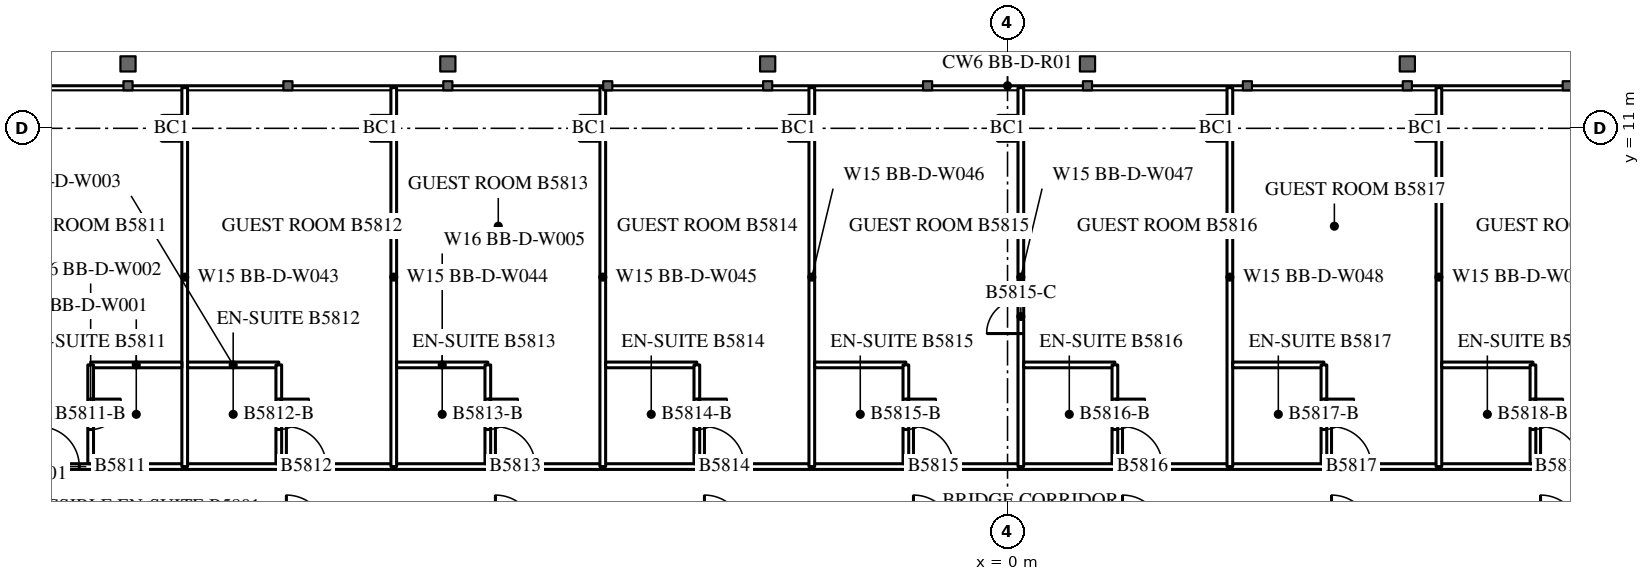
"""IFC4 building model, lengths in metres.
Left out: names, types, materials, properties, quantities, classifications, styles, units other than length and angle.
Written with IfcOpenShell. Run it as: python <this file> out.ifc"""

import sys

from ifc_helpers import new_model, si_unit, direction, frame, frame_2d, origin, origin_2d, place, context, subcontext, project, spatial, rectangle, i_section, extrude, element, fill, save


model = new_model("IFC4")
c1 = context("Model", 3, precision=1e-05, world=origin(), true_north=direction((0.0, 1.0)))
c2 = subcontext(c1, "Body", "Model", "MODEL_VIEW")
j1 = project(units=[si_unit("LENGTHUNIT", "METRE"), si_unit("PLANEANGLEUNIT", "RADIAN")], contexts=[c1])
p1 = place(None, origin())
s1 = spatial("IfcSite", under=j1, at=p1, CompositionType="ELEMENT")
p2 = place(p1, origin())
s2 = spatial("IfcBuilding", under=s1, at=p2, CompositionType="ELEMENT")
p3 = place(p2, frame((0.0, 0.0, 218.9)))
s3 = spatial("IfcBuildingStorey", under=s2, at=p3, CompositionType="ELEMENT", Elevation=218.9)
for number, where, z_axis, x_axis in (
    (1, (-22.0, 11.0, 0.0), (0.0, 0.0, 1.0), (1.0, 0.0, 0.0)),
    (2, (-16.5, 11.0, 0.0), (0.0, 0.0, 1.0), (1.0, 0.0, 0.0)),
    (3, (-11.0, 11.0, 0.0), (0.0, 0.0, 1.0), (1.0, 0.0, 0.0)),
    (4, (-5.5, 11.0, 0.0), (0.0, 0.0, 1.0), (1.0, 0.0, 0.0)),
    (5, (0.0, 11.0, 0.0), (0.0, 0.0, 1.0), (1.0, 0.0, 0.0)),
    (6, (5.5, 11.0, 0.0), (0.0, 0.0, 1.0), (1.0, 0.0, 0.0)),
    (7, (11.0, 11.0, 0.0), (0.0, 0.0, 1.0), (1.0, 0.0, 0.0)),
):
    element("IfcColumn", number, at=place(p3, frame(where, z_axis=z_axis, x_axis=x_axis)), inside=s3, PredefinedType="COLUMN", context=c2, shape_type="SweptSolid", body=[
        extrude(i_section(OverallWidth=0.476, OverallDepth=0.6, WebThickness=0.1, FlangeThickness=0.14, FilletRadius=0.02, at=origin_2d()), origin(), (0.0, 0.0, 1.0), 3.6),
    ])
p4 = place(p3, frame((-27.5, 2.1, 0.0), z_axis=(0.0, 0.0, 1.0), x_axis=(1.0, 0.0, 0.0)))
e8 = element("IfcWall", 8, at=p4, inside=s3, PredefinedType="PARTITIONING", context=c2, shape_type="SweptSolid", body=[
    extrude(rectangle(XDim=55.0, YDim=0.15, at=frame_2d((27.5, 0.0))), origin(), (0.0, 0.0, 1.0), 3.4),
])
p5 = place(p4, frame((2.025, 0.0, 0.0)))
e9 = element("IfcOpeningElement", 9, at=p5, cuts=e8, PredefinedType="OPENING", context=c2, shape_type="SweptSolid", body=[
    extrude(rectangle(XDim=1.05, YDim=2.4, at=frame_2d((0.525, 1.2))), frame((0.0, 0.085, 0.0), z_axis=(0.0, -1.0, 0.0), x_axis=(1.0, 0.0, 0.0)), (0.0, 0.0, 1.0), 0.17),
])
p6 = place(p4, frame((8.525, 0.0, 0.0)))
e10 = element("IfcOpeningElement", 10, at=p6, cuts=e8, PredefinedType="OPENING", context=c2, shape_type="SweptSolid", body=[
    extrude(rectangle(XDim=1.05, YDim=2.4, at=frame_2d((0.525, 1.2))), frame((0.0, 0.085, 0.0), z_axis=(0.0, -1.0, 0.0), x_axis=(1.0, 0.0, 0.0)), (0.0, 0.0, 1.0), 0.17),
])
p7 = place(p4, frame((14.025, 0.0, 0.0)))
e11 = element("IfcOpeningElement", 11, at=p7, cuts=e8, PredefinedType="OPENING", context=c2, shape_type="SweptSolid", body=[
    extrude(rectangle(XDim=1.05, YDim=2.4, at=frame_2d((0.525, 1.2))), frame((0.0, 0.085, 0.0), z_axis=(0.0, -1.0, 0.0), x_axis=(1.0, 0.0, 0.0)), (0.0, 0.0, 1.0), 0.17),
])
p8 = place(p4, frame((19.525, 0.0, 0.0)))
e12 = element("IfcOpeningElement", 12, at=p8, cuts=e8, PredefinedType="OPENING", context=c2, shape_type="SweptSolid", body=[
    extrude(rectangle(XDim=1.05, YDim=2.4, at=frame_2d((0.525, 1.2))), frame((0.0, 0.085, 0.0), z_axis=(0.0, -1.0, 0.0), x_axis=(1.0, 0.0, 0.0)), (0.0, 0.0, 1.0), 0.17),
])
p9 = place(p4, frame((25.025, 0.0, 0.0)))
e13 = element("IfcOpeningElement", 13, at=p9, cuts=e8, PredefinedType="OPENING", context=c2, shape_type="SweptSolid", body=[
    extrude(rectangle(XDim=1.05, YDim=2.4, at=frame_2d((0.525, 1.2))), frame((0.0, 0.085, 0.0), z_axis=(0.0, -1.0, 0.0), x_axis=(1.0, 0.0, 0.0)), (0.0, 0.0, 1.0), 0.17),
])
p10 = place(p4, frame((30.525, 0.0, 0.0)))
e14 = element("IfcOpeningElement", 14, at=p10, cuts=e8, PredefinedType="OPENING", context=c2, shape_type="SweptSolid", body=[
    extrude(rectangle(XDim=1.05, YDim=2.4, at=frame_2d((0.525, 1.2))), frame((0.0, 0.085, 0.0), z_axis=(0.0, -1.0, 0.0), x_axis=(1.0, 0.0, 0.0)), (0.0, 0.0, 1.0), 0.17),
])
p11 = place(p4, frame((36.025, 0.0, 0.0)))
e15 = element("IfcOpeningElement", 15, at=p11, cuts=e8, PredefinedType="OPENING", context=c2, shape_type="SweptSolid", body=[
    extrude(rectangle(XDim=1.05, YDim=2.4, at=frame_2d((0.525, 1.2))), frame((0.0, 0.085, 0.0), z_axis=(0.0, -1.0, 0.0), x_axis=(1.0, 0.0, 0.0)), (0.0, 0.0, 1.0), 0.17),
])
p12 = place(p4, frame((41.525, 0.0, 0.0)))
e16 = element("IfcOpeningElement", 16, at=p12, cuts=e8, PredefinedType="OPENING", context=c2, shape_type="SweptSolid", body=[
    extrude(rectangle(XDim=1.05, YDim=2.4, at=frame_2d((0.525, 1.2))), frame((0.0, 0.085, 0.0), z_axis=(0.0, -1.0, 0.0), x_axis=(1.0, 0.0, 0.0)), (0.0, 0.0, 1.0), 0.17),
])
p13 = place(p4, frame((47.025, 0.0, 0.0)))
e17 = element("IfcOpeningElement", 17, at=p13, cuts=e8, PredefinedType="OPENING", context=c2, shape_type="SweptSolid", body=[
    extrude(rectangle(XDim=1.05, YDim=2.4, at=frame_2d((0.525, 1.2))), frame((0.0, 0.085, 0.0), z_axis=(0.0, -1.0, 0.0), x_axis=(1.0, 0.0, 0.0)), (0.0, 0.0, 1.0), 0.17),
])
p14 = place(p4, frame((52.525, 0.0, 0.0)))
e18 = element("IfcOpeningElement", 18, at=p14, cuts=e8, PredefinedType="OPENING", context=c2, shape_type="SweptSolid", body=[
    extrude(rectangle(XDim=1.05, YDim=2.4, at=frame_2d((0.525, 1.2))), frame((0.0, 0.085, 0.0), z_axis=(0.0, -1.0, 0.0), x_axis=(1.0, 0.0, 0.0)), (0.0, 0.0, 1.0), 0.17),
])
for number, where, z_axis, x_axis in (
    (19, (-21.65, 2.1, 0.0), (0.0, 0.0, 1.0), (0.0, 1.0, 0.0)),
    (20, (-16.15, 2.1, 0.0), (0.0, 0.0, 1.0), (0.0, 1.0, 0.0)),
    (21, (-10.65, 2.1, 0.0), (0.0, 0.0, 1.0), (0.0, 1.0, 0.0)),
    (22, (-5.15, 2.1, 0.0), (0.0, 0.0, 1.0), (0.0, 1.0, 0.0)),
):
    element("IfcWall", number, at=place(p3, frame(where, z_axis=z_axis, x_axis=x_axis)), inside=s3, PredefinedType="PARTITIONING", context=c2, shape_type="SweptSolid", body=[
        extrude(rectangle(XDim=9.97, YDim=0.15, at=frame_2d((4.985, 0.0))), origin(), (0.0, 0.0, 1.0), 3.4),
    ])
p15 = place(p3, frame((0.35, 2.1, 0.0), z_axis=(0.0, 0.0, 1.0), x_axis=(0.0, 1.0, 0.0)))
e23 = element("IfcWall", 23, at=p15, inside=s3, PredefinedType="PARTITIONING", context=c2, shape_type="SweptSolid", body=[
    extrude(rectangle(XDim=9.97, YDim=0.15, at=frame_2d((4.985, 0.0))), origin(), (0.0, 0.0, 1.0), 3.4),
])
p16 = place(p15, frame((3.5, 0.0, 0.0)))
e24 = element("IfcOpeningElement", 24, at=p16, cuts=e23, PredefinedType="OPENING", context=c2, shape_type="SweptSolid", body=[
    extrude(rectangle(XDim=0.9, YDim=2.2, at=frame_2d((0.45, 1.1))), frame((0.0, 0.085, 0.0), z_axis=(0.0, -1.0, 0.0), x_axis=(1.0, 0.0, 0.0)), (0.0, 0.0, 1.0), 0.17),
])
for number, where, z_axis, x_axis in (
    (25, (5.85, 2.1, 0.0), (0.0, 0.0, 1.0), (0.0, 1.0, 0.0)),
    (26, (11.35, 2.1, 0.0), (0.0, 0.0, 1.0), (0.0, 1.0, 0.0)),
):
    element("IfcWall", number, at=place(p3, frame(where, z_axis=z_axis, x_axis=x_axis)), inside=s3, PredefinedType="PARTITIONING", context=c2, shape_type="SweptSolid", body=[
        extrude(rectangle(XDim=9.97, YDim=0.15, at=frame_2d((4.985, 0.0))), origin(), (0.0, 0.0, 1.0), 3.4),
    ])
p17 = place(p3, frame((-24.125, 4.775, 0.0), z_axis=(0.0, 0.0, 1.0), x_axis=(1.0, 0.0, 0.0)))
e27 = element("IfcWall", 27, at=p17, inside=s3, PredefinedType="PARTITIONING", context=c2, shape_type="SweptSolid", body=[
    extrude(rectangle(XDim=2.4, YDim=0.15, at=frame_2d((1.2, 0.0))), origin(), (0.0, 0.0, 1.0), 3.4),
])
p18 = place(p3, frame((-24.125, 2.175, 0.0), z_axis=(0.0, 0.0, 1.0), x_axis=(0.0, 1.0, 0.0)))
e28 = element("IfcWall", 28, at=p18, inside=s3, PredefinedType="PARTITIONING", context=c2, shape_type="SweptSolid", body=[
    extrude(rectangle(XDim=2.6, YDim=0.15, at=frame_2d((1.3, 0.0))), origin(), (0.0, 0.0, 1.0), 3.4),
])
p19 = place(p18, frame((0.9, 0.0, 0.0)))
e29 = element("IfcOpeningElement", 29, at=p19, cuts=e28, PredefinedType="OPENING", context=c2, shape_type="SweptSolid", body=[
    extrude(rectangle(XDim=0.8, YDim=2.2, at=frame_2d((0.4, 1.1))), frame((0.0, 0.085, 0.0), z_axis=(0.0, -1.0, 0.0), x_axis=(1.0, 0.0, 0.0)), (0.0, 0.0, 1.0), 0.17),
])
p20 = place(p3, frame((-21.575, 4.775, 0.0), z_axis=(0.0, 0.0, 1.0), x_axis=(1.0, 0.0, 0.0)))
e30 = element("IfcWall", 30, at=p20, inside=s3, PredefinedType="PARTITIONING", context=c2, shape_type="SweptSolid", body=[
    extrude(rectangle(XDim=2.4, YDim=0.15, at=frame_2d((1.2, 0.0))), origin(), (0.0, 0.0, 1.0), 3.4),
])
p21 = place(p3, frame((-19.175, 2.175, 0.0), z_axis=(0.0, 0.0, 1.0), x_axis=(0.0, 1.0, 0.0)))
e31 = element("IfcWall", 31, at=p21, inside=s3, PredefinedType="PARTITIONING", context=c2, shape_type="SweptSolid", body=[
    extrude(rectangle(XDim=2.6, YDim=0.15, at=frame_2d((1.3, 0.0))), origin(), (0.0, 0.0, 1.0), 3.4),
])
p22 = place(p21, frame((0.9, 0.0, 0.0)))
e32 = element("IfcOpeningElement", 32, at=p22, cuts=e31, PredefinedType="OPENING", context=c2, shape_type="SweptSolid", body=[
    extrude(rectangle(XDim=0.8, YDim=2.2, at=frame_2d((0.4, 1.1))), frame((0.0, 0.085, 0.0), z_axis=(0.0, -1.0, 0.0), x_axis=(1.0, 0.0, 0.0)), (0.0, 0.0, 1.0), 0.17),
])
p23 = place(p3, frame((-16.075, 4.775, 0.0), z_axis=(0.0, 0.0, 1.0), x_axis=(1.0, 0.0, 0.0)))
e33 = element("IfcWall", 33, at=p23, inside=s3, PredefinedType="PARTITIONING", context=c2, shape_type="SweptSolid", body=[
    extrude(rectangle(XDim=2.4, YDim=0.15, at=frame_2d((1.2, 0.0))), origin(), (0.0, 0.0, 1.0), 3.4),
])
p24 = place(p3, frame((-13.675, 2.175, 0.0), z_axis=(0.0, 0.0, 1.0), x_axis=(0.0, 1.0, 0.0)))
e34 = element("IfcWall", 34, at=p24, inside=s3, PredefinedType="PARTITIONING", context=c2, shape_type="SweptSolid", body=[
    extrude(rectangle(XDim=2.6, YDim=0.15, at=frame_2d((1.3, 0.0))), origin(), (0.0, 0.0, 1.0), 3.4),
])
p25 = place(p24, frame((0.9, 0.0, 0.0)))
e35 = element("IfcOpeningElement", 35, at=p25, cuts=e34, PredefinedType="OPENING", context=c2, shape_type="SweptSolid", body=[
    extrude(rectangle(XDim=0.8, YDim=2.2, at=frame_2d((0.4, 1.1))), frame((0.0, 0.085, 0.0), z_axis=(0.0, -1.0, 0.0), x_axis=(1.0, 0.0, 0.0)), (0.0, 0.0, 1.0), 0.17),
])
p26 = place(p3, frame((-10.575, 4.775, 0.0), z_axis=(0.0, 0.0, 1.0), x_axis=(1.0, 0.0, 0.0)))
e36 = element("IfcWall", 36, at=p26, inside=s3, PredefinedType="PARTITIONING", context=c2, shape_type="SweptSolid", body=[
    extrude(rectangle(XDim=2.4, YDim=0.15, at=frame_2d((1.2, 0.0))), origin(), (0.0, 0.0, 1.0), 3.4),
])
p27 = place(p3, frame((-8.175, 2.175, 0.0), z_axis=(0.0, 0.0, 1.0), x_axis=(0.0, 1.0, 0.0)))
e37 = element("IfcWall", 37, at=p27, inside=s3, PredefinedType="PARTITIONING", context=c2, shape_type="SweptSolid", body=[
    extrude(rectangle(XDim=2.6, YDim=0.15, at=frame_2d((1.3, 0.0))), origin(), (0.0, 0.0, 1.0), 3.4),
])
p28 = place(p27, frame((0.9, 0.0, 0.0)))
e38 = element("IfcOpeningElement", 38, at=p28, cuts=e37, PredefinedType="OPENING", context=c2, shape_type="SweptSolid", body=[
    extrude(rectangle(XDim=0.8, YDim=2.2, at=frame_2d((0.4, 1.1))), frame((0.0, 0.085, 0.0), z_axis=(0.0, -1.0, 0.0), x_axis=(1.0, 0.0, 0.0)), (0.0, 0.0, 1.0), 0.17),
])
p29 = place(p3, frame((-5.075, 4.775, 0.0), z_axis=(0.0, 0.0, 1.0), x_axis=(1.0, 0.0, 0.0)))
e39 = element("IfcWall", 39, at=p29, inside=s3, PredefinedType="PARTITIONING", context=c2, shape_type="SweptSolid", body=[
    extrude(rectangle(XDim=2.4, YDim=0.15, at=frame_2d((1.2, 0.0))), origin(), (0.0, 0.0, 1.0), 3.4),
])
p30 = place(p3, frame((-2.675, 2.175, 0.0), z_axis=(0.0, 0.0, 1.0), x_axis=(0.0, 1.0, 0.0)))
e40 = element("IfcWall", 40, at=p30, inside=s3, PredefinedType="PARTITIONING", context=c2, shape_type="SweptSolid", body=[
    extrude(rectangle(XDim=2.6, YDim=0.15, at=frame_2d((1.3, 0.0))), origin(), (0.0, 0.0, 1.0), 3.4),
])
p31 = place(p30, frame((0.9, 0.0, 0.0)))
e41 = element("IfcOpeningElement", 41, at=p31, cuts=e40, PredefinedType="OPENING", context=c2, shape_type="SweptSolid", body=[
    extrude(rectangle(XDim=0.8, YDim=2.2, at=frame_2d((0.4, 1.1))), frame((0.0, 0.085, 0.0), z_axis=(0.0, -1.0, 0.0), x_axis=(1.0, 0.0, 0.0)), (0.0, 0.0, 1.0), 0.17),
])
p32 = place(p3, frame((0.425, 4.775, 0.0), z_axis=(0.0, 0.0, 1.0), x_axis=(1.0, 0.0, 0.0)))
e42 = element("IfcWall", 42, at=p32, inside=s3, PredefinedType="PARTITIONING", context=c2, shape_type="SweptSolid", body=[
    extrude(rectangle(XDim=2.4, YDim=0.15, at=frame_2d((1.2, 0.0))), origin(), (0.0, 0.0, 1.0), 3.4),
])
p33 = place(p3, frame((2.825, 2.175, 0.0), z_axis=(0.0, 0.0, 1.0), x_axis=(0.0, 1.0, 0.0)))
e43 = element("IfcWall", 43, at=p33, inside=s3, PredefinedType="PARTITIONING", context=c2, shape_type="SweptSolid", body=[
    extrude(rectangle(XDim=2.6, YDim=0.15, at=frame_2d((1.3, 0.0))), origin(), (0.0, 0.0, 1.0), 3.4),
])
p34 = place(p33, frame((0.9, 0.0, 0.0)))
e44 = element("IfcOpeningElement", 44, at=p34, cuts=e43, PredefinedType="OPENING", context=c2, shape_type="SweptSolid", body=[
    extrude(rectangle(XDim=0.8, YDim=2.2, at=frame_2d((0.4, 1.1))), frame((0.0, 0.085, 0.0), z_axis=(0.0, -1.0, 0.0), x_axis=(1.0, 0.0, 0.0)), (0.0, 0.0, 1.0), 0.17),
])
p35 = place(p3, frame((5.925, 4.775, 0.0), z_axis=(0.0, 0.0, 1.0), x_axis=(1.0, 0.0, 0.0)))
e45 = element("IfcWall", 45, at=p35, inside=s3, PredefinedType="PARTITIONING", context=c2, shape_type="SweptSolid", body=[
    extrude(rectangle(XDim=2.4, YDim=0.15, at=frame_2d((1.2, 0.0))), origin(), (0.0, 0.0, 1.0), 3.4),
])
p36 = place(p3, frame((8.325, 2.175, 0.0), z_axis=(0.0, 0.0, 1.0), x_axis=(0.0, 1.0, 0.0)))
e46 = element("IfcWall", 46, at=p36, inside=s3, PredefinedType="PARTITIONING", context=c2, shape_type="SweptSolid", body=[
    extrude(rectangle(XDim=2.6, YDim=0.15, at=frame_2d((1.3, 0.0))), origin(), (0.0, 0.0, 1.0), 3.4),
])
p37 = place(p36, frame((0.9, 0.0, 0.0)))
e47 = element("IfcOpeningElement", 47, at=p37, cuts=e46, PredefinedType="OPENING", context=c2, shape_type="SweptSolid", body=[
    extrude(rectangle(XDim=0.8, YDim=2.2, at=frame_2d((0.4, 1.1))), frame((0.0, 0.085, 0.0), z_axis=(0.0, -1.0, 0.0), x_axis=(1.0, 0.0, 0.0)), (0.0, 0.0, 1.0), 0.17),
])
p38 = place(p3, frame((11.425, 4.775, 0.0), z_axis=(0.0, 0.0, 1.0), x_axis=(1.0, 0.0, 0.0)))
e48 = element("IfcWall", 48, at=p38, inside=s3, PredefinedType="PARTITIONING", context=c2, shape_type="SweptSolid", body=[
    extrude(rectangle(XDim=2.4, YDim=0.15, at=frame_2d((1.2, 0.0))), origin(), (0.0, 0.0, 1.0), 3.4),
])
p39 = place(p3, frame((13.825, 2.175, 0.0), z_axis=(0.0, 0.0, 1.0), x_axis=(0.0, 1.0, 0.0)))
e49 = element("IfcWall", 49, at=p39, inside=s3, PredefinedType="PARTITIONING", context=c2, shape_type="SweptSolid", body=[
    extrude(rectangle(XDim=2.6, YDim=0.15, at=frame_2d((1.3, 0.0))), origin(), (0.0, 0.0, 1.0), 3.4),
])
p40 = place(p39, frame((0.9, 0.0, 0.0)))
e50 = element("IfcOpeningElement", 50, at=p40, cuts=e49, PredefinedType="OPENING", context=c2, shape_type="SweptSolid", body=[
    extrude(rectangle(XDim=0.8, YDim=2.2, at=frame_2d((0.4, 1.1))), frame((0.0, 0.085, 0.0), z_axis=(0.0, -1.0, 0.0), x_axis=(1.0, 0.0, 0.0)), (0.0, 0.0, 1.0), 0.17),
])
p41 = place(p19, origin())
e51 = element("IfcDoor", 51, at=p41, inside=s3, OperationType="SINGLE_SWING_RIGHT", PredefinedType="DOOR", context=c2, shape_type="SweptSolid", body=[
    extrude(rectangle(XDim=0.8, YDim=2.2, at=frame_2d((0.4, 1.1))), frame((0.0, 0.025, 0.0), z_axis=(0.0, -1.0, 0.0), x_axis=(1.0, 0.0, 0.0)), (0.0, 0.0, 1.0), 0.05),
])
fill(e29, e51)
p42 = place(p5, origin())
e52 = element("IfcDoor", 52, at=p42, inside=s3, OperationType="SINGLE_SWING_LEFT", PredefinedType="DOOR", context=c2, shape_type="SweptSolid", body=[
    extrude(rectangle(XDim=1.05, YDim=2.4, at=frame_2d((0.525, 1.2))), frame((0.0, 0.025, 0.0), z_axis=(0.0, -1.0, 0.0), x_axis=(1.0, 0.0, 0.0)), (0.0, 0.0, 1.0), 0.05),
])
fill(e9, e52)
p43 = place(p22, origin())
e53 = element("IfcDoor", 53, at=p43, inside=s3, OperationType="SINGLE_SWING_RIGHT", PredefinedType="DOOR", context=c2, shape_type="SweptSolid", body=[
    extrude(rectangle(XDim=0.8, YDim=2.2, at=frame_2d((0.4, 1.1))), frame((0.0, 0.025, 0.0), z_axis=(0.0, -1.0, 0.0), x_axis=(1.0, 0.0, 0.0)), (0.0, 0.0, 1.0), 0.05),
])
fill(e32, e53)
p44 = place(p6, origin())
e54 = element("IfcDoor", 54, at=p44, inside=s3, OperationType="SINGLE_SWING_LEFT", PredefinedType="DOOR", context=c2, shape_type="SweptSolid", body=[
    extrude(rectangle(XDim=1.05, YDim=2.4, at=frame_2d((0.525, 1.2))), frame((0.0, 0.025, 0.0), z_axis=(0.0, -1.0, 0.0), x_axis=(1.0, 0.0, 0.0)), (0.0, 0.0, 1.0), 0.05),
])
fill(e10, e54)
p45 = place(p25, origin())
e55 = element("IfcDoor", 55, at=p45, inside=s3, OperationType="SINGLE_SWING_RIGHT", PredefinedType="DOOR", context=c2, shape_type="SweptSolid", body=[
    extrude(rectangle(XDim=0.8, YDim=2.2, at=frame_2d((0.4, 1.1))), frame((0.0, 0.025, 0.0), z_axis=(0.0, -1.0, 0.0), x_axis=(1.0, 0.0, 0.0)), (0.0, 0.0, 1.0), 0.05),
])
fill(e35, e55)
p46 = place(p7, origin())
e56 = element("IfcDoor", 56, at=p46, inside=s3, OperationType="SINGLE_SWING_LEFT", PredefinedType="DOOR", context=c2, shape_type="SweptSolid", body=[
    extrude(rectangle(XDim=1.05, YDim=2.4, at=frame_2d((0.525, 1.2))), frame((0.0, 0.025, 0.0), z_axis=(0.0, -1.0, 0.0), x_axis=(1.0, 0.0, 0.0)), (0.0, 0.0, 1.0), 0.05),
])
fill(e11, e56)
p47 = place(p28, origin())
e57 = element("IfcDoor", 57, at=p47, inside=s3, OperationType="SINGLE_SWING_RIGHT", PredefinedType="DOOR", context=c2, shape_type="SweptSolid", body=[
    extrude(rectangle(XDim=0.8, YDim=2.2, at=frame_2d((0.4, 1.1))), frame((0.0, 0.025, 0.0), z_axis=(0.0, -1.0, 0.0), x_axis=(1.0, 0.0, 0.0)), (0.0, 0.0, 1.0), 0.05),
])
fill(e38, e57)
p48 = place(p8, origin())
e58 = element("IfcDoor", 58, at=p48, inside=s3, OperationType="SINGLE_SWING_LEFT", PredefinedType="DOOR", context=c2, shape_type="SweptSolid", body=[
    extrude(rectangle(XDim=1.05, YDim=2.4, at=frame_2d((0.525, 1.2))), frame((0.0, 0.025, 0.0), z_axis=(0.0, -1.0, 0.0), x_axis=(1.0, 0.0, 0.0)), (0.0, 0.0, 1.0), 0.05),
])
fill(e12, e58)
p49 = place(p31, origin())
e59 = element("IfcDoor", 59, at=p49, inside=s3, OperationType="SINGLE_SWING_RIGHT", PredefinedType="DOOR", context=c2, shape_type="SweptSolid", body=[
    extrude(rectangle(XDim=0.8, YDim=2.2, at=frame_2d((0.4, 1.1))), frame((0.0, 0.025, 0.0), z_axis=(0.0, -1.0, 0.0), x_axis=(1.0, 0.0, 0.0)), (0.0, 0.0, 1.0), 0.05),
])
fill(e41, e59)
p50 = place(p9, origin())
e60 = element("IfcDoor", 60, at=p50, inside=s3, OperationType="SINGLE_SWING_LEFT", PredefinedType="DOOR", context=c2, shape_type="SweptSolid", body=[
    extrude(rectangle(XDim=1.05, YDim=2.4, at=frame_2d((0.525, 1.2))), frame((0.0, 0.025, 0.0), z_axis=(0.0, -1.0, 0.0), x_axis=(1.0, 0.0, 0.0)), (0.0, 0.0, 1.0), 0.05),
])
fill(e13, e60)
p51 = place(p34, origin())
e61 = element("IfcDoor", 61, at=p51, inside=s3, OperationType="SINGLE_SWING_RIGHT", PredefinedType="DOOR", context=c2, shape_type="SweptSolid", body=[
    extrude(rectangle(XDim=0.8, YDim=2.2, at=frame_2d((0.4, 1.1))), frame((0.0, 0.025, 0.0), z_axis=(0.0, -1.0, 0.0), x_axis=(1.0, 0.0, 0.0)), (0.0, 0.0, 1.0), 0.05),
])
fill(e44, e61)
p52 = place(p10, origin())
e62 = element("IfcDoor", 62, at=p52, inside=s3, OperationType="SINGLE_SWING_LEFT", PredefinedType="DOOR", context=c2, shape_type="SweptSolid", body=[
    extrude(rectangle(XDim=1.05, YDim=2.4, at=frame_2d((0.525, 1.2))), frame((0.0, 0.025, 0.0), z_axis=(0.0, -1.0, 0.0), x_axis=(1.0, 0.0, 0.0)), (0.0, 0.0, 1.0), 0.05),
])
fill(e14, e62)
p53 = place(p37, origin())
e63 = element("IfcDoor", 63, at=p53, inside=s3, OperationType="SINGLE_SWING_RIGHT", PredefinedType="DOOR", context=c2, shape_type="SweptSolid", body=[
    extrude(rectangle(XDim=0.8, YDim=2.2, at=frame_2d((0.4, 1.1))), frame((0.0, 0.025, 0.0), z_axis=(0.0, -1.0, 0.0), x_axis=(1.0, 0.0, 0.0)), (0.0, 0.0, 1.0), 0.05),
])
fill(e47, e63)
p54 = place(p11, origin())
e64 = element("IfcDoor", 64, at=p54, inside=s3, OperationType="SINGLE_SWING_LEFT", PredefinedType="DOOR", context=c2, shape_type="SweptSolid", body=[
    extrude(rectangle(XDim=1.05, YDim=2.4, at=frame_2d((0.525, 1.2))), frame((0.0, 0.025, 0.0), z_axis=(0.0, -1.0, 0.0), x_axis=(1.0, 0.0, 0.0)), (0.0, 0.0, 1.0), 0.05),
])
fill(e15, e64)
p55 = place(p40, origin())
e65 = element("IfcDoor", 65, at=p55, inside=s3, OperationType="SINGLE_SWING_RIGHT", PredefinedType="DOOR", context=c2, shape_type="SweptSolid", body=[
    extrude(rectangle(XDim=0.8, YDim=2.2, at=frame_2d((0.4, 1.1))), frame((0.0, 0.025, 0.0), z_axis=(0.0, -1.0, 0.0), x_axis=(1.0, 0.0, 0.0)), (0.0, 0.0, 1.0), 0.05),
])
fill(e50, e65)
p56 = place(p12, origin())
e66 = element("IfcDoor", 66, at=p56, inside=s3, OperationType="SINGLE_SWING_LEFT", PredefinedType="DOOR", context=c2, shape_type="SweptSolid", body=[
    extrude(rectangle(XDim=1.05, YDim=2.4, at=frame_2d((0.525, 1.2))), frame((0.0, 0.025, 0.0), z_axis=(0.0, -1.0, 0.0), x_axis=(1.0, 0.0, 0.0)), (0.0, 0.0, 1.0), 0.05),
])
fill(e16, e66)
p57 = place(p16, origin())
e67 = element("IfcDoor", 67, at=p57, inside=s3, OperationType="SINGLE_SWING_LEFT", PredefinedType="DOOR", context=c2, shape_type="SweptSolid", body=[
    extrude(rectangle(XDim=0.9, YDim=2.2, at=frame_2d((0.45, 1.1))), frame((0.0, 0.025, 0.0), z_axis=(0.0, -1.0, 0.0), x_axis=(1.0, 0.0, 0.0)), (0.0, 0.0, 1.0), 0.05),
])
fill(e24, e67)
save(model, sys.argv[1])
